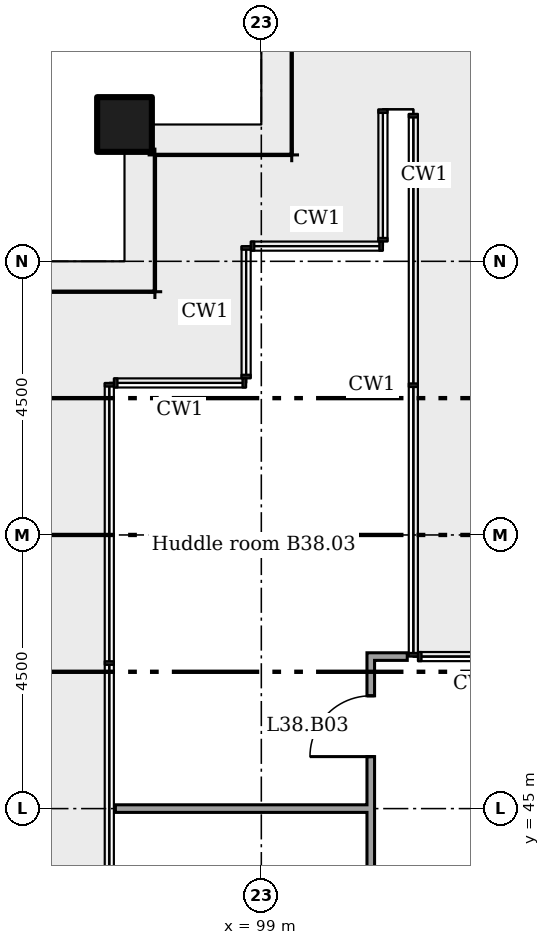
"""IFC4 building model, lengths in metres.
Left out: names, types, materials, properties, quantities, classifications, styles, units other than length and angle.
Written with IfcOpenShell. Run it as: python <this file> out.ifc"""

import sys

from ifc_helpers import new_model, si_unit, direction, frame, frame_2d, origin, origin_2d, place, context, subcontext, project, spatial, rectangle, extrude, element, fill, save


model = new_model("IFC4")
c1 = context("Model", 3, precision=1e-05, world=origin(), true_north=direction((0.0, 1.0)))
c2 = subcontext(c1, "Body", "Model", "MODEL_VIEW")
j1 = project(units=[si_unit("LENGTHUNIT", "METRE"), si_unit("PLANEANGLEUNIT", "RADIAN")], contexts=[c1])
p1 = place(None, origin())
s1 = spatial("IfcSite", under=j1, at=p1, CompositionType="ELEMENT")
p2 = place(p1, origin())
s2 = spatial("IfcBuilding", under=s1, at=p2, CompositionType="ELEMENT")
p3 = place(p2, frame((0.0, 0.0, 154.6)))
s3 = spatial("IfcBuildingStorey", under=s2, at=p3, CompositionType="ELEMENT", Elevation=154.6)
p4 = place(p3, frame((96.75, 56.25, 0.0)))
e1 = element("IfcColumn", 1, at=p4, inside=s3, PredefinedType="COLUMN", context=c2, shape_type="SweptSolid", body=[
    extrude(rectangle(XDim=0.9, YDim=0.9, at=origin_2d()), origin(), (0.0, 0.0, 1.0), 3.6),
])
p5 = place(p3, frame((96.6, 45.0, 0.0)))
e2 = element("IfcWall", 2, at=p5, inside=s3, PredefinedType="PARTITIONING", context=c2, shape_type="SweptSolid", body=[
    extrude(rectangle(XDim=4.2, YDim=0.125, at=frame_2d((2.1, 0.0))), origin(), (0.0, 0.0, 1.0), 2.851),
])
p6 = place(p3, frame((100.738, 47.5, 0.0)))
e3 = element("IfcWall", 3, at=p6, inside=s3, PredefinedType="PARTITIONING", context=c2, shape_type="SweptSolid", body=[
    extrude(rectangle(XDim=0.662, YDim=0.125, at=frame_2d((0.331, 0.0))), origin(), (0.0, 0.0, 1.0), 3.45),
])
p7 = place(p3, frame((100.8, 33.062, 0.0), z_axis=(0.0, 0.0, 1.0), x_axis=(0.0, 1.0, 0.0)))
e4 = element("IfcWall", 4, at=p7, inside=s3, PredefinedType="PARTITIONING", context=c2, shape_type="SweptSolid", body=[
    extrude(rectangle(XDim=14.375, YDim=0.125, at=frame_2d((7.188, 0.0))), origin(), (0.0, 0.0, 1.0), 3.45),
])
p8 = place(p7, frame((6.938, 0.0, 0.0)))
e5 = element("IfcOpeningElement", 5, at=p8, cuts=e4, PredefinedType="OPENING", context=c2, shape_type="SweptSolid", body=[
    extrude(rectangle(XDim=1.0, YDim=2.1, at=frame_2d((0.5, 1.05))), frame((0.0, 0.073, 0.0), z_axis=(0.0, -1.0, 0.0), x_axis=(1.0, 0.0, 0.0)), (0.0, 0.0, 1.0), 0.145),
])
p9 = place(p7, frame((12.792, 0.0, 0.0)))
e6 = element("IfcOpeningElement", 6, at=p9, cuts=e4, PredefinedType="OPENING", context=c2, shape_type="SweptSolid", body=[
    extrude(rectangle(XDim=1.0, YDim=2.1, at=frame_2d((0.5, 1.05))), frame((0.0, 0.073, 0.0), z_axis=(0.0, -1.0, 0.0), x_axis=(1.0, 0.0, 0.0)), (0.0, 0.0, 1.0), 0.145),
])
p10 = place(p9, origin())
e7 = element("IfcDoor", 7, at=p10, inside=s3, OperationType="SINGLE_SWING_RIGHT", PredefinedType="DOOR", context=c2, shape_type="SweptSolid", body=[
    extrude(rectangle(XDim=1.0, YDim=2.1, at=frame_2d((0.5, 1.05))), frame((0.0, 0.025, 0.0), z_axis=(0.0, -1.0, 0.0), x_axis=(1.0, 0.0, 0.0)), (0.0, 0.0, 1.0), 0.05),
])
fill(e6, e7)
save(model, sys.argv[1])
